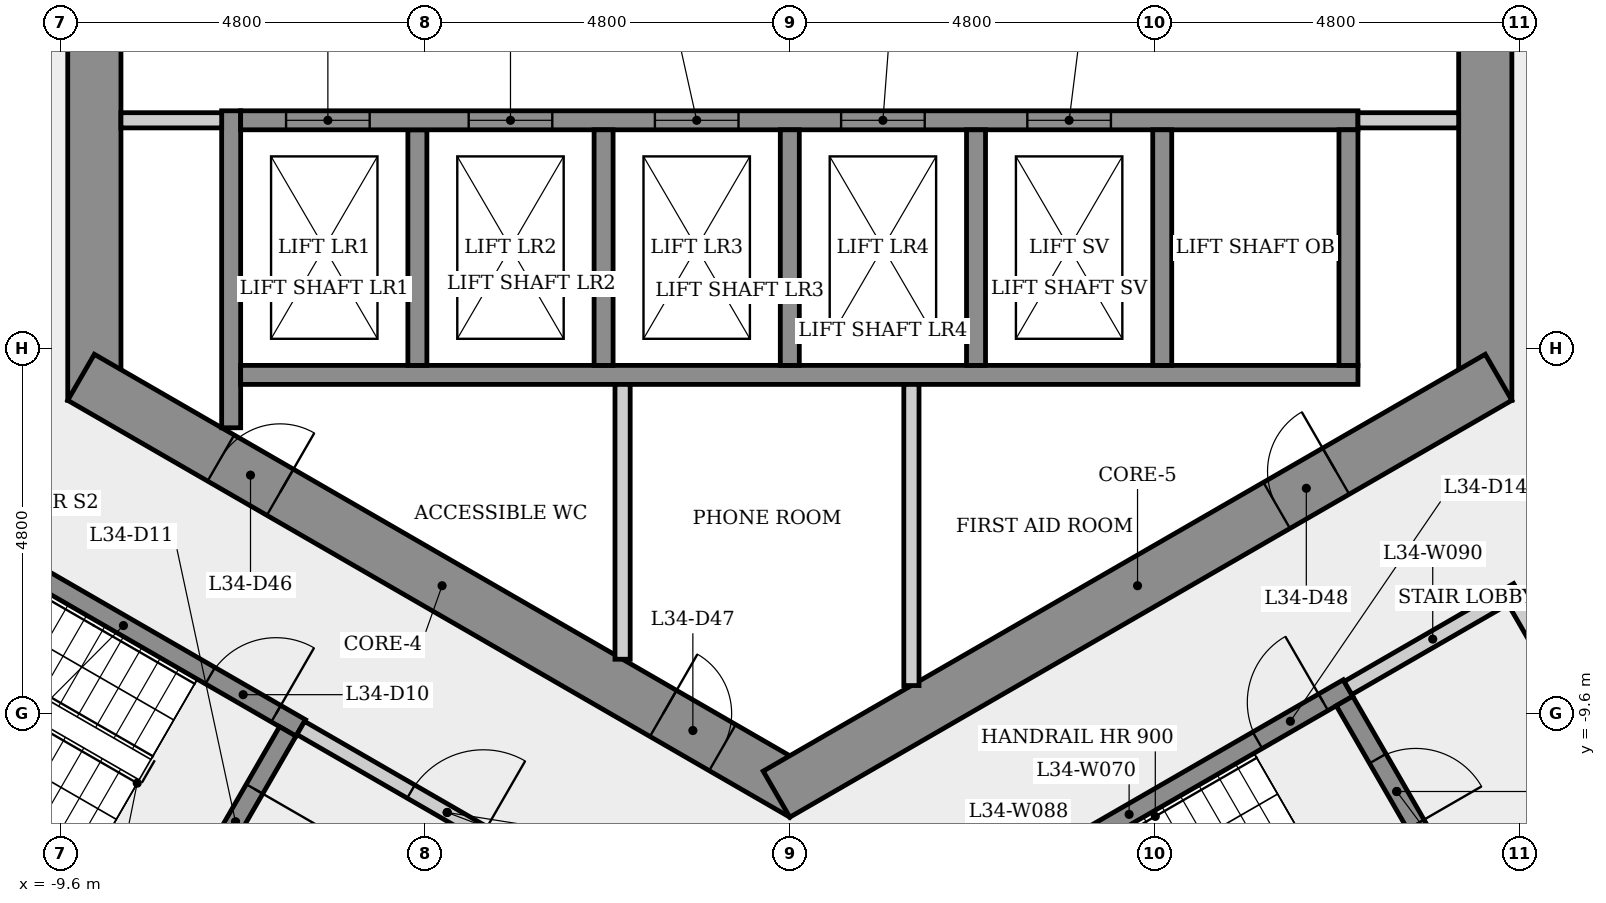
"""IFC4 building model, lengths in metres.
Left out: names, types, materials, properties, quantities, classifications, styles, units other than length and angle.
Written with IfcOpenShell. Run it as: python <this file> out.ifc"""

import sys

from ifc_helpers import new_model, si_unit, direction, frame, frame_2d, origin, place, context, subcontext, project, spatial, rectangle, extrude, element, fill, save


model = new_model("IFC4")
c1 = context("Model", 3, precision=1e-05, world=origin(), true_north=direction((0.0, 1.0)))
c2 = subcontext(c1, "Body", "Model", "MODEL_VIEW")
j1 = project(units=[si_unit("LENGTHUNIT", "METRE"), si_unit("PLANEANGLEUNIT", "RADIAN")], contexts=[c1])
p1 = place(None, origin())
s1 = spatial("IfcSite", under=j1, at=p1, CompositionType="ELEMENT")
p2 = place(p1, origin())
s2 = spatial("IfcBuilding", under=s1, at=p2, CompositionType="ELEMENT")
p3 = place(p2, frame((0.0, 0.0, 128.5)))
s3 = spatial("IfcBuildingStorey", under=s2, at=p3, CompositionType="ELEMENT", Elevation=128.5)
p4 = place(p3, frame((9.15, -5.485, 0.0), z_axis=(0.0, 0.0, 1.0), x_axis=(0.0, 1.0, 0.0)))
e1 = element("IfcWall", 1, at=p4, inside=s3, PredefinedType="SHEAR", context=c2, shape_type="SweptSolid", body=[
    extrude(rectangle(XDim=10.97, YDim=0.7, at=frame_2d((5.485, 0.0))), origin(), (0.0, 0.0, 1.0), 4.0),
])
p5 = place(p4, frame((4.685, 0.0, 0.0)))
e2 = element("IfcOpeningElement", 2, at=p5, cuts=e1, PredefinedType="OPENING", context=c2, shape_type="SweptSolid", body=[
    extrude(rectangle(XDim=1.6, YDim=2.1, at=frame_2d((0.8, 1.05))), frame((0.0, 0.36, 0.0), z_axis=(0.0, -1.0, 0.0), x_axis=(1.0, 0.0, 0.0)), (0.0, 0.0, 1.0), 0.72),
])
p6 = place(p3, frame((-9.15, 5.485, 0.0), z_axis=(0.0, 0.0, 1.0), x_axis=(0.0, -1.0, 0.0)))
e3 = element("IfcWall", 3, at=p6, inside=s3, PredefinedType="SHEAR", context=c2, shape_type="SweptSolid", body=[
    extrude(rectangle(XDim=10.97, YDim=0.7, at=frame_2d((5.485, 0.0))), origin(), (0.0, 0.0, 1.0), 4.0),
])
p7 = place(p6, frame((4.685, 0.0, 0.0)))
e4 = element("IfcOpeningElement", 4, at=p7, cuts=e3, PredefinedType="OPENING", context=c2, shape_type="SweptSolid", body=[
    extrude(rectangle(XDim=1.6, YDim=2.1, at=frame_2d((0.8, 1.05))), frame((0.0, 0.36, 0.0), z_axis=(0.0, -1.0, 0.0), x_axis=(1.0, 0.0, 0.0)), (0.0, 0.0, 1.0), 0.72),
])
p8 = place(p3, frame((-9.325, -5.182, 0.0), z_axis=(0.0, 0.0, 1.0), x_axis=(0.866023993627, -0.500002442456, 0.0)))
e5 = element("IfcWall", 5, at=p8, inside=s3, PredefinedType="SHEAR", context=c2, shape_type="SweptSolid", body=[
    extrude(rectangle(XDim=10.97, YDim=0.7, at=frame_2d((5.485, 0.0))), origin(), (0.0, 0.0, 1.0), 4.0),
])
p9 = place(p8, frame((2.125, 0.0, 0.0)))
e6 = element("IfcOpeningElement", 6, at=p9, cuts=e5, PredefinedType="OPENING", context=c2, shape_type="SweptSolid", body=[
    extrude(rectangle(XDim=0.9, YDim=2.1, at=frame_2d((0.45, 1.05))), frame((0.0, 0.36, 0.0), z_axis=(0.0, -1.0, 0.0), x_axis=(1.0, 0.0, 0.0)), (0.0, 0.0, 1.0), 0.72),
])
p10 = place(p8, frame((8.845, 0.0, 0.0)))
e7 = element("IfcOpeningElement", 7, at=p10, cuts=e5, PredefinedType="OPENING", context=c2, shape_type="SweptSolid", body=[
    extrude(rectangle(XDim=0.9, YDim=2.1, at=frame_2d((0.45, 1.05))), frame((0.0, 0.36, 0.0), z_axis=(0.0, -1.0, 0.0), x_axis=(1.0, 0.0, 0.0)), (0.0, 0.0, 1.0), 0.72),
])
p11 = place(p3, frame((-0.175, -10.667, 0.0), z_axis=(0.0, 0.0, 1.0), x_axis=(0.866023993627, 0.500002442456, 0.0)))
e8 = element("IfcWall", 8, at=p11, inside=s3, PredefinedType="SHEAR", context=c2, shape_type="SweptSolid", body=[
    extrude(rectangle(XDim=10.97, YDim=0.7, at=frame_2d((5.485, 0.0))), origin(), (0.0, 0.0, 1.0), 4.0),
])
p12 = place(p11, frame((7.599, 0.0, 0.0)))
e9 = element("IfcOpeningElement", 9, at=p12, cuts=e8, PredefinedType="OPENING", context=c2, shape_type="SweptSolid", body=[
    extrude(rectangle(XDim=0.9, YDim=2.1, at=frame_2d((0.45, 1.05))), frame((0.0, 0.36, 0.0), z_axis=(0.0, -1.0, 0.0), x_axis=(1.0, 0.0, 0.0)), (0.0, 0.0, 1.0), 0.72),
])
p13 = place(p3, frame((-11.1, -7.101, 0.0), z_axis=(0.0, 0.0, 1.0), x_axis=(0.866028615007, -0.499994437958, 0.0)))
e10 = element("IfcWall", 10, at=p13, inside=s3, PredefinedType="SHEAR", context=c2, shape_type="SweptSolid", body=[
    extrude(rectangle(XDim=5.387, YDim=0.25, at=frame_2d((2.694, 0.0))), origin(), (0.0, 0.0, 1.0), 3.65),
])
p14 = place(p13, frame((4.012, 0.0, 0.0)))
e11 = element("IfcOpeningElement", 11, at=p14, cuts=e10, PredefinedType="OPENING", context=c2, shape_type="SweptSolid", body=[
    extrude(rectangle(XDim=1.0, YDim=2.1, at=frame_2d((0.5, 1.05))), frame((0.0, 0.135, 0.0), z_axis=(0.0, -1.0, 0.0), x_axis=(1.0, 0.0, 0.0)), (0.0, 0.0, 1.0), 0.27),
])
p15 = place(p3, frame((-7.935, -12.393, 0.0), z_axis=(0.0, 0.0, 1.0), x_axis=(-0.866025499775, 0.499999833739, 0.0)))
e12 = element("IfcWall", 12, at=p15, inside=s3, PredefinedType="SHEAR", context=c2, shape_type="SweptSolid", body=[
    extrude(rectangle(XDim=6.4, YDim=0.25, at=frame_2d((3.2, 0.0))), origin(), (0.0, 0.0, 1.0), 3.65),
])
p16 = place(p3, frame((-7.35, -5.846, 0.0), z_axis=(0.0, 0.0, 1.0), x_axis=(0.0, 1.0, 0.0)))
e13 = element("IfcWall", 13, at=p16, inside=s3, PredefinedType="SHEAR", context=c2, shape_type="SweptSolid", body=[
    extrude(rectangle(XDim=4.171, YDim=0.25, at=frame_2d((2.085, 0.0))), origin(), (0.0, 0.0, 1.0), 3.65),
])
p17 = place(p3, frame((-7.475, -1.8, 0.0), z_axis=(0.0, 0.0, 1.0), x_axis=(-1.0, 0.0, 0.0)))
e14 = element("IfcWall", 14, at=p17, inside=s3, PredefinedType="PARTITIONING", context=c2, shape_type="SweptSolid", body=[
    extrude(rectangle(XDim=1.325, YDim=0.2, at=frame_2d((0.663, 0.0))), origin(), (0.0, 0.0, 1.0), 3.65),
])
p18 = place(p3, frame((-6.605, -9.841, 0.0), z_axis=(0.0, 0.0, 1.0), x_axis=(-0.499996545922, -0.866027397988, 0.0)))
e15 = element("IfcWall", 15, at=p18, inside=s3, PredefinedType="SHEAR", context=c2, shape_type="SweptSolid", body=[
    extrude(rectangle(XDim=2.75, YDim=0.25, at=frame_2d((1.375, 0.0))), origin(), (0.0, 0.0, 1.0), 3.65),
])
p19 = place(p18, frame((0.875, 0.0, 0.0)))
e16 = element("IfcOpeningElement", 16, at=p19, cuts=e15, PredefinedType="OPENING", context=c2, shape_type="SweptSolid", body=[
    extrude(rectangle(XDim=1.0, YDim=2.1, at=frame_2d((0.5, 1.05))), frame((0.0, 0.135, 0.0), z_axis=(0.0, -1.0, 0.0), x_axis=(1.0, 0.0, 0.0)), (0.0, 0.0, 1.0), 0.27),
])
p20 = place(p3, frame((-6.435, -9.795, 0.0), z_axis=(0.0, 0.0, 1.0), x_axis=(0.866012907634, -0.500021643343, 0.0)))
e17 = element("IfcWall", 17, at=p20, inside=s3, PredefinedType="PARTITIONING", context=c2, shape_type="SweptSolid", body=[
    extrude(rectangle(XDim=4.45, YDim=0.2, at=frame_2d((2.225, 0.0))), origin(), (0.0, 0.0, 1.0), 3.65),
])
p21 = place(p20, frame((1.675, 0.0, 0.0)))
e18 = element("IfcOpeningElement", 18, at=p21, cuts=e17, PredefinedType="OPENING", context=c2, shape_type="SweptSolid", body=[
    extrude(rectangle(XDim=1.1, YDim=2.1, at=frame_2d((0.55, 1.05))), frame((0.0, 0.11, 0.0), z_axis=(0.0, -1.0, 0.0), x_axis=(1.0, 0.0, 0.0)), (0.0, 0.0, 1.0), 0.22),
])
p22 = place(p3, frame((-7.225, -5.15, 0.0), z_axis=(0.0, 0.0, 1.0), x_axis=(1.0, 0.0, 0.0)))
e19 = element("IfcWall", 19, at=p22, inside=s3, PredefinedType="SHEAR", context=c2, shape_type="SweptSolid", body=[
    extrude(rectangle(XDim=14.7, YDim=0.25, at=frame_2d((7.35, 0.0))), origin(), (0.0, 0.0, 1.0), 3.65),
])
p23 = place(p3, frame((-4.9, -1.925, 0.0), z_axis=(0.0, 0.0, 1.0), x_axis=(0.0, -1.0, 0.0)))
e20 = element("IfcWall", 20, at=p23, inside=s3, PredefinedType="SHEAR", context=c2, shape_type="SweptSolid", body=[
    extrude(rectangle(XDim=3.1, YDim=0.25, at=frame_2d((1.55, 0.0))), origin(), (0.0, 0.0, 1.0), 4.0),
])
p24 = place(p3, frame((-7.225, -1.8, 0.0), z_axis=(0.0, 0.0, 1.0), x_axis=(1.0, 0.0, 0.0)))
e21 = element("IfcWall", 21, at=p24, inside=s3, PredefinedType="SHEAR", context=c2, shape_type="SweptSolid", body=[
    extrude(rectangle(XDim=14.7, YDim=0.25, at=frame_2d((7.35, 0.0))), origin(), (0.0, 0.0, 1.0), 3.65),
])
p25 = place(p24, frame((0.597, 0.0, 0.0)))
e22 = element("IfcOpeningElement", 22, at=p25, cuts=e21, PredefinedType="OPENING", context=c2, shape_type="SweptSolid", body=[
    extrude(rectangle(XDim=1.1, YDim=2.1, at=frame_2d((0.55, 1.05))), frame((0.0, 0.135, 0.0), z_axis=(0.0, -1.0, 0.0), x_axis=(1.0, 0.0, 0.0)), (0.0, 0.0, 1.0), 0.27),
])
p26 = place(p24, frame((3.0, 0.0, 0.0)))
e23 = element("IfcOpeningElement", 23, at=p26, cuts=e21, PredefinedType="OPENING", context=c2, shape_type="SweptSolid", body=[
    extrude(rectangle(XDim=1.1, YDim=2.1, at=frame_2d((0.55, 1.05))), frame((0.0, 0.135, 0.0), z_axis=(0.0, -1.0, 0.0), x_axis=(1.0, 0.0, 0.0)), (0.0, 0.0, 1.0), 0.27),
])
p27 = place(p24, frame((5.45, 0.0, 0.0)))
e24 = element("IfcOpeningElement", 24, at=p27, cuts=e21, PredefinedType="OPENING", context=c2, shape_type="SweptSolid", body=[
    extrude(rectangle(XDim=1.1, YDim=2.1, at=frame_2d((0.55, 1.05))), frame((0.0, 0.135, 0.0), z_axis=(0.0, -1.0, 0.0), x_axis=(1.0, 0.0, 0.0)), (0.0, 0.0, 1.0), 0.27),
])
p28 = place(p24, frame((7.9, 0.0, 0.0)))
e25 = element("IfcOpeningElement", 25, at=p28, cuts=e21, PredefinedType="OPENING", context=c2, shape_type="SweptSolid", body=[
    extrude(rectangle(XDim=1.1, YDim=2.1, at=frame_2d((0.55, 1.05))), frame((0.0, 0.135, 0.0), z_axis=(0.0, -1.0, 0.0), x_axis=(1.0, 0.0, 0.0)), (0.0, 0.0, 1.0), 0.27),
])
p29 = place(p24, frame((10.35, 0.0, 0.0)))
e26 = element("IfcOpeningElement", 26, at=p29, cuts=e21, PredefinedType="OPENING", context=c2, shape_type="SweptSolid", body=[
    extrude(rectangle(XDim=1.1, YDim=2.1, at=frame_2d((0.55, 1.05))), frame((0.0, 0.135, 0.0), z_axis=(0.0, -1.0, 0.0), x_axis=(1.0, 0.0, 0.0)), (0.0, 0.0, 1.0), 0.27),
])
p30 = place(p3, frame((-2.45, -1.925, 0.0), z_axis=(0.0, 0.0, 1.0), x_axis=(0.0, -1.0, 0.0)))
e27 = element("IfcWall", 27, at=p30, inside=s3, PredefinedType="SHEAR", context=c2, shape_type="SweptSolid", body=[
    extrude(rectangle(XDim=3.1, YDim=0.25, at=frame_2d((1.55, 0.0))), origin(), (0.0, 0.0, 1.0), 4.0),
])
p31 = place(p3, frame((-2.2, -5.275, 0.0), z_axis=(0.0, 0.0, 1.0), x_axis=(0.0, -1.0, 0.0)))
e28 = element("IfcWall", 28, at=p31, inside=s3, PredefinedType="PARTITIONING", context=c2, shape_type="SweptSolid", body=[
    extrude(rectangle(XDim=3.616, YDim=0.2, at=frame_2d((1.808, 0.0))), origin(), (0.0, 0.0, 1.0), 3.65),
])
p32 = place(p3, frame((0.0, -1.925, 0.0), z_axis=(0.0, 0.0, 1.0), x_axis=(0.0, -1.0, 0.0)))
e29 = element("IfcWall", 29, at=p32, inside=s3, PredefinedType="SHEAR", context=c2, shape_type="SweptSolid", body=[
    extrude(rectangle(XDim=3.1, YDim=0.25, at=frame_2d((1.55, 0.0))), origin(), (0.0, 0.0, 1.0), 4.0),
])
p33 = place(p3, frame((1.6, -5.275, 0.0), z_axis=(0.0, 0.0, 1.0), x_axis=(0.0, -1.0, 0.0)))
e30 = element("IfcWall", 30, at=p33, inside=s3, PredefinedType="PARTITIONING", context=c2, shape_type="SweptSolid", body=[
    extrude(rectangle(XDim=3.963, YDim=0.2, at=frame_2d((1.981, 0.0))), origin(), (0.0, 0.0, 1.0), 3.65),
])
p34 = place(p3, frame((1.585, -12.595, 0.0), z_axis=(0.0, 0.0, 1.0), x_axis=(0.866036417653, 0.499980922934, 0.0)))
e31 = element("IfcWall", 31, at=p34, inside=s3, PredefinedType="SHEAR", context=c2, shape_type="SweptSolid", body=[
    extrude(rectangle(XDim=6.65, YDim=0.25, at=frame_2d((3.325, 0.0))), origin(), (0.0, 0.0, 1.0), 3.65),
])
p35 = place(p34, frame((5.275, 0.0, 0.0)))
e32 = element("IfcOpeningElement", 32, at=p35, cuts=e31, PredefinedType="OPENING", context=c2, shape_type="SweptSolid", body=[
    extrude(rectangle(XDim=1.0, YDim=2.1, at=frame_2d((0.5, 1.05))), frame((0.0, 0.135, 0.0), z_axis=(0.0, -1.0, 0.0), x_axis=(1.0, 0.0, 0.0)), (0.0, 0.0, 1.0), 0.27),
])
for number, where, z_axis, x_axis in (
    (33, (2.45, -1.925, 0.0), (0.0, 0.0, 1.0), (0.0, -1.0, 0.0)),
    (34, (4.9, -1.925, 0.0), (0.0, 0.0, 1.0), (0.0, -1.0, 0.0)),
):
    element("IfcWall", number, at=place(p3, frame(where, z_axis=z_axis, x_axis=x_axis)), inside=s3, PredefinedType="SHEAR", context=c2, shape_type="SweptSolid", body=[
        extrude(rectangle(XDim=3.1, YDim=0.25, at=frame_2d((1.55, 0.0))), origin(), (0.0, 0.0, 1.0), 4.0),
    ])
p36 = place(p3, frame((7.298, -9.441, 0.0), z_axis=(0.0, 0.0, 1.0), x_axis=(0.500034990121, -0.866005201286, 0.0)))
e35 = element("IfcWall", 35, at=p36, inside=s3, PredefinedType="SHEAR", context=c2, shape_type="SweptSolid", body=[
    extrude(rectangle(XDim=2.75, YDim=0.25, at=frame_2d((1.375, 0.0))), origin(), (0.0, 0.0, 1.0), 3.65),
])
p37 = place(p36, frame((0.875, 0.0, 0.0)))
e36 = element("IfcOpeningElement", 36, at=p37, cuts=e35, PredefinedType="OPENING", context=c2, shape_type="SweptSolid", body=[
    extrude(rectangle(XDim=1.0, YDim=2.1, at=frame_2d((0.5, 1.05))), frame((0.0, 0.135, 0.0), z_axis=(0.0, -1.0, 0.0), x_axis=(1.0, 0.0, 0.0)), (0.0, 0.0, 1.0), 0.27),
])
p38 = place(p3, frame((7.344, -9.27, 0.0), z_axis=(0.0, 0.0, 1.0), x_axis=(0.866005588531, 0.500034319456, 0.0)))
e37 = element("IfcWall", 37, at=p38, inside=s3, PredefinedType="PARTITIONING", context=c2, shape_type="SweptSolid", body=[
    extrude(rectangle(XDim=2.575, YDim=0.2, at=frame_2d((1.288, 0.0))), origin(), (0.0, 0.0, 1.0), 3.65),
])
p39 = place(p3, frame((7.35, -1.925, 0.0), z_axis=(0.0, 0.0, 1.0), x_axis=(0.0, -1.0, 0.0)))
e38 = element("IfcWall", 38, at=p39, inside=s3, PredefinedType="SHEAR", context=c2, shape_type="SweptSolid", body=[
    extrude(rectangle(XDim=3.1, YDim=0.25, at=frame_2d((1.55, 0.0))), origin(), (0.0, 0.0, 1.0), 4.0),
])
p40 = place(p3, frame((8.8, -1.8, 0.0), z_axis=(0.0, 0.0, 1.0), x_axis=(-1.0, 0.0, 0.0)))
e39 = element("IfcWall", 39, at=p40, inside=s3, PredefinedType="PARTITIONING", context=c2, shape_type="SweptSolid", body=[
    extrude(rectangle(XDim=1.325, YDim=0.2, at=frame_2d((0.663, 0.0))), origin(), (0.0, 0.0, 1.0), 3.65),
])
p41 = place(p3, frame((9.537, -8.119, 0.0), z_axis=(0.0, 0.0, 1.0), x_axis=(0.499990139034, -0.866031096941, 0.0)))
e40 = element("IfcWall", 40, at=p41, inside=s3, PredefinedType="PARTITIONING", context=c2, shape_type="SweptSolid", body=[
    extrude(rectangle(XDim=3.0, YDim=0.2, at=frame_2d((1.5, 0.0))), origin(), (0.0, 0.0, 1.0), 3.65),
])
p42 = place(p41, frame((0.935, 0.0, 0.0)))
e41 = element("IfcOpeningElement", 41, at=p42, cuts=e40, PredefinedType="OPENING", context=c2, shape_type="SweptSolid", body=[
    extrude(rectangle(XDim=1.0, YDim=2.1, at=frame_2d((0.5, 1.05))), frame((0.0, 0.11, 0.0), z_axis=(0.0, -1.0, 0.0), x_axis=(1.0, 0.0, 0.0)), (0.0, 0.0, 1.0), 0.22),
])
p43 = place(p3, frame((10.901, -10.681, 0.0), z_axis=(0.0, 0.0, 1.0), x_axis=(-0.866007538022, -0.500030943131, 0.0)))
e42 = element("IfcWall", 42, at=p43, inside=s3, PredefinedType="PLUMBINGWALL", context=c2, shape_type="SweptSolid", body=[
    extrude(rectangle(XDim=2.375, YDim=0.2, at=frame_2d((1.188, 0.0))), origin(), (0.0, 0.0, 1.0), 3.65),
])
p44 = place(p25, origin())
e43 = element("IfcDoor", 43, at=p44, inside=s3, OperationType="SLIDING_TO_LEFT", PredefinedType="DOOR", context=c2, shape_type="SweptSolid", body=[
    extrude(rectangle(XDim=1.1, YDim=2.1, at=frame_2d((0.55, 1.05))), frame((0.0, 0.025, 0.0), z_axis=(0.0, -1.0, 0.0), x_axis=(1.0, 0.0, 0.0)), (0.0, 0.0, 1.0), 0.05),
])
fill(e22, e43)
p45 = place(p26, origin())
e44 = element("IfcDoor", 44, at=p45, inside=s3, OperationType="SLIDING_TO_LEFT", PredefinedType="DOOR", context=c2, shape_type="SweptSolid", body=[
    extrude(rectangle(XDim=1.1, YDim=2.1, at=frame_2d((0.55, 1.05))), frame((0.0, 0.025, 0.0), z_axis=(0.0, -1.0, 0.0), x_axis=(1.0, 0.0, 0.0)), (0.0, 0.0, 1.0), 0.05),
])
fill(e23, e44)
p46 = place(p27, origin())
e45 = element("IfcDoor", 45, at=p46, inside=s3, OperationType="SLIDING_TO_LEFT", PredefinedType="DOOR", context=c2, shape_type="SweptSolid", body=[
    extrude(rectangle(XDim=1.1, YDim=2.1, at=frame_2d((0.55, 1.05))), frame((0.0, 0.025, 0.0), z_axis=(0.0, -1.0, 0.0), x_axis=(1.0, 0.0, 0.0)), (0.0, 0.0, 1.0), 0.05),
])
fill(e24, e45)
p47 = place(p28, origin())
e46 = element("IfcDoor", 46, at=p47, inside=s3, OperationType="SLIDING_TO_LEFT", PredefinedType="DOOR", context=c2, shape_type="SweptSolid", body=[
    extrude(rectangle(XDim=1.1, YDim=2.1, at=frame_2d((0.55, 1.05))), frame((0.0, 0.025, 0.0), z_axis=(0.0, -1.0, 0.0), x_axis=(1.0, 0.0, 0.0)), (0.0, 0.0, 1.0), 0.05),
])
fill(e25, e46)
p48 = place(p29, origin())
e47 = element("IfcDoor", 47, at=p48, inside=s3, OperationType="SLIDING_TO_LEFT", PredefinedType="DOOR", context=c2, shape_type="SweptSolid", body=[
    extrude(rectangle(XDim=1.1, YDim=2.1, at=frame_2d((0.55, 1.05))), frame((0.0, 0.025, 0.0), z_axis=(0.0, -1.0, 0.0), x_axis=(1.0, 0.0, 0.0)), (0.0, 0.0, 1.0), 0.05),
])
fill(e26, e47)
p49 = place(p14, origin())
e48 = element("IfcDoor", 48, at=p49, inside=s3, OperationType="SINGLE_SWING_RIGHT", PredefinedType="DOOR", context=c2, shape_type="SweptSolid", body=[
    extrude(rectangle(XDim=1.0, YDim=2.1, at=frame_2d((0.5, 1.05))), frame((0.0, 0.025, 0.0), z_axis=(0.0, -1.0, 0.0), x_axis=(1.0, 0.0, 0.0)), (0.0, 0.0, 1.0), 0.05),
])
fill(e11, e48)
p50 = place(p19, origin())
e49 = element("IfcDoor", 49, at=p50, inside=s3, OperationType="SINGLE_SWING_LEFT", PredefinedType="DOOR", context=c2, shape_type="SweptSolid", body=[
    extrude(rectangle(XDim=1.0, YDim=2.1, at=frame_2d((0.5, 1.05))), frame((0.0, 0.025, 0.0), z_axis=(0.0, -1.0, 0.0), x_axis=(1.0, 0.0, 0.0)), (0.0, 0.0, 1.0), 0.05),
])
fill(e16, e49)
p51 = place(p21, origin())
e50 = element("IfcDoor", 50, at=p51, inside=s3, OperationType="SINGLE_SWING_RIGHT", PredefinedType="DOOR", context=c2, shape_type="SweptSolid", body=[
    extrude(rectangle(XDim=1.1, YDim=2.1, at=frame_2d((0.55, 1.05))), frame((0.0, 0.025, 0.0), z_axis=(0.0, -1.0, 0.0), x_axis=(1.0, 0.0, 0.0)), (0.0, 0.0, 1.0), 0.05),
])
fill(e18, e50)
p52 = place(p35, origin())
e51 = element("IfcDoor", 51, at=p52, inside=s3, OperationType="SINGLE_SWING_RIGHT", PredefinedType="DOOR", context=c2, shape_type="SweptSolid", body=[
    extrude(rectangle(XDim=1.0, YDim=2.1, at=frame_2d((0.5, 1.05))), frame((0.0, 0.025, 0.0), z_axis=(0.0, -1.0, 0.0), x_axis=(1.0, 0.0, 0.0)), (0.0, 0.0, 1.0), 0.05),
])
fill(e32, e51)
p53 = place(p37, origin())
e52 = element("IfcDoor", 52, at=p53, inside=s3, OperationType="SINGLE_SWING_RIGHT", PredefinedType="DOOR", context=c2, shape_type="SweptSolid", body=[
    extrude(rectangle(XDim=1.0, YDim=2.1, at=frame_2d((0.5, 1.05))), frame((0.0, 0.025, 0.0), z_axis=(0.0, -1.0, 0.0), x_axis=(1.0, 0.0, 0.0)), (0.0, 0.0, 1.0), 0.05),
])
fill(e36, e52)
p54 = place(p9, origin())
e53 = element("IfcDoor", 53, at=p54, inside=s3, OperationType="SINGLE_SWING_RIGHT", PredefinedType="DOOR", context=c2, shape_type="SweptSolid", body=[
    extrude(rectangle(XDim=0.9, YDim=2.1, at=frame_2d((0.45, 1.05))), frame((0.0, 0.025, 0.0), z_axis=(0.0, -1.0, 0.0), x_axis=(1.0, 0.0, 0.0)), (0.0, 0.0, 1.0), 0.05),
])
fill(e6, e53)
p55 = place(p10, origin())
e54 = element("IfcDoor", 54, at=p55, inside=s3, OperationType="SINGLE_SWING_LEFT", PredefinedType="DOOR", context=c2, shape_type="SweptSolid", body=[
    extrude(rectangle(XDim=0.9, YDim=2.1, at=frame_2d((0.45, 1.05))), frame((0.0, 0.025, 0.0), z_axis=(0.0, -1.0, 0.0), x_axis=(1.0, 0.0, 0.0)), (0.0, 0.0, 1.0), 0.05),
])
fill(e7, e54)
p56 = place(p12, origin())
e55 = element("IfcDoor", 55, at=p56, inside=s3, OperationType="SINGLE_SWING_RIGHT", PredefinedType="DOOR", context=c2, shape_type="SweptSolid", body=[
    extrude(rectangle(XDim=0.9, YDim=2.1, at=frame_2d((0.45, 1.05))), frame((0.0, 0.025, 0.0), z_axis=(0.0, -1.0, 0.0), x_axis=(1.0, 0.0, 0.0)), (0.0, 0.0, 1.0), 0.05),
])
fill(e9, e55)
save(model, sys.argv[1])
